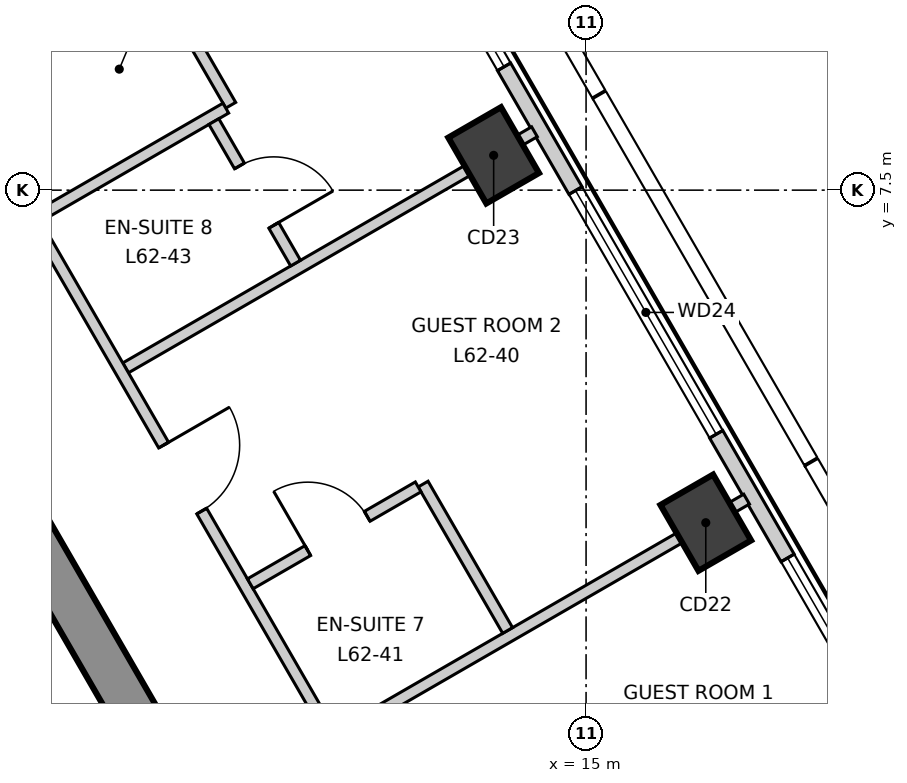
"""IFC4 building model, lengths in metres.
Left out: names, types, materials, properties, quantities, classifications, styles, units other than length and angle.
Written with IfcOpenShell. Run it as: python <this file> out.ifc"""

import sys

from ifc_helpers import new_model, si_unit, direction, frame, frame_2d, origin, origin_2d, place, context, subcontext, project, spatial, polyline, rectangle, outline, extrude, element, fill, save


model = new_model("IFC4")
c1 = context("Model", 3, precision=1e-05, world=origin(), true_north=direction((0.0, 1.0)))
c2 = subcontext(c1, "Body", "Model", "MODEL_VIEW")
j1 = project(units=[si_unit("LENGTHUNIT", "METRE"), si_unit("PLANEANGLEUNIT", "RADIAN")], contexts=[c1])
p1 = place(None, origin())
s1 = spatial("IfcSite", under=j1, at=p1, CompositionType="ELEMENT")
p2 = place(p1, origin())
s2 = spatial("IfcBuilding", under=s1, at=p2, CompositionType="ELEMENT")
p3 = place(p2, frame((0.0, 0.0, 268.3)))
s3 = spatial("IfcBuildingStorey", under=s2, at=p3, CompositionType="ELEMENT", Elevation=268.3)
p4 = place(p3, frame((12.384, -5.15, -0.3), z_axis=(0.0, 0.0, 1.0), x_axis=(-0.500000539815, 0.866025092122, 0.0)))
e1 = element("IfcWall", 1, at=p4, inside=s3, PredefinedType="SHEAR", context=c2, shape_type="SweptSolid", body=[
    extrude(outline(polyline([(-0.173, -0.301), (1.795, -0.301), (3.763, -0.301), (5.731, -0.301), (7.7, -0.301), (9.668, -0.301), (11.636, -0.301), (13.604, -0.3), (15.573, -0.3), (17.541, -0.3), (19.509, -0.3), (21.477, -0.3), (21.131, 0.3), (19.226, 0.3), (17.321, 0.3), (15.415, 0.3), (13.51, 0.3), (11.605, 0.3), (9.699, 0.3), (7.794, 0.3), (5.889, 0.3), (3.984, 0.3), (2.078, 0.3), (0.173, 0.3), (-0.173, -0.301)])), origin(), (0.0, 0.0, 1.0), 3.6),
])
p5 = place(p4, frame((15.627, 0.0, 0.3)))
e2 = element("IfcOpeningElement", 2, at=p5, cuts=e1, PredefinedType="OPENING", context=c2, shape_type="SweptSolid", body=[
    extrude(rectangle(XDim=0.9, YDim=2.1, at=frame_2d((0.45, 1.05))), frame((0.0, 0.31, 0.0), z_axis=(0.0, -1.0, 0.0), x_axis=(1.0, 0.0, 0.0)), (0.0, 0.0, 1.0), 0.621),
])
p6 = place(p4, frame((4.026, 0.0, 0.3)))
e3 = element("IfcOpeningElement", 3, at=p6, cuts=e1, PredefinedType="OPENING", context=c2, shape_type="SweptSolid", body=[
    extrude(rectangle(XDim=0.9, YDim=2.1, at=frame_2d((0.45, 1.05))), frame((0.0, 0.31, 0.0), z_axis=(0.0, -1.0, 0.0), x_axis=(1.0, 0.0, 0.0)), (0.0, 0.0, 1.0), 0.621),
])
for number, where, z_axis, x_axis in (
    (4, (16.575, 3.125, -0.3), (0.0, 0.0, 1.0), (-0.5, 0.866, 0.0)),
    (5, (13.784, 7.958, -0.3), (0.0, 0.0, 1.0), (-0.5, 0.866, 0.0)),
):
    element("IfcColumn", number, at=place(p3, frame(where, z_axis=z_axis, x_axis=x_axis)), inside=s3, PredefinedType="COLUMN", context=c2, shape_type="SweptSolid", body=[
        extrude(rectangle(XDim=1.0, YDim=0.8, at=origin_2d()), origin(), (0.0, 0.0, 1.0), 3.6),
    ])
p7 = place(p3, frame((26.205, -12.154, 0.0), z_axis=(0.0, 0.0, 1.0), x_axis=(-0.49999909388, 0.866025926932, 0.0)))
e6 = element("IfcWall", 6, at=p7, inside=s3, PredefinedType="ELEMENTEDWALL", context=c2, shape_type="SweptSolid", body=[
    extrude(rectangle(XDim=47.236, YDim=0.2, at=frame_2d((23.618, 0.0))), origin(), (0.0, 0.0, 1.0), 3.3),
])
p8 = place(p7, frame((2.243, 0.0, 0.9)))
e7 = element("IfcOpeningElement", 7, at=p8, cuts=e6, PredefinedType="OPENING", context=c2, shape_type="SweptSolid", body=[
    extrude(rectangle(XDim=3.7, YDim=2.2, at=frame_2d((1.85, 1.1))), frame((0.0, 0.11, 0.0), z_axis=(0.0, -1.0, 0.0), x_axis=(1.0, 0.0, 0.0)), (0.0, 0.0, 1.0), 0.22),
])
p9 = place(p7, frame((7.825, 0.0, 0.9)))
e8 = element("IfcOpeningElement", 8, at=p9, cuts=e6, PredefinedType="OPENING", context=c2, shape_type="SweptSolid", body=[
    extrude(rectangle(XDim=3.7, YDim=2.2, at=frame_2d((1.85, 1.1))), frame((0.0, 0.11, 0.0), z_axis=(0.0, -1.0, 0.0), x_axis=(1.0, 0.0, 0.0)), (0.0, 0.0, 1.0), 0.22),
])
p10 = place(p7, frame((13.406, 0.0, 0.9)))
e9 = element("IfcOpeningElement", 9, at=p10, cuts=e6, PredefinedType="OPENING", context=c2, shape_type="SweptSolid", body=[
    extrude(rectangle(XDim=3.7, YDim=2.2, at=frame_2d((1.85, 1.1))), frame((0.0, 0.11, 0.0), z_axis=(0.0, -1.0, 0.0), x_axis=(1.0, 0.0, 0.0)), (0.0, 0.0, 1.0), 0.22),
])
p11 = place(p7, frame((18.987, 0.0, 0.9)))
e10 = element("IfcOpeningElement", 10, at=p11, cuts=e6, PredefinedType="OPENING", context=c2, shape_type="SweptSolid", body=[
    extrude(rectangle(XDim=3.7, YDim=2.2, at=frame_2d((1.85, 1.1))), frame((0.0, 0.11, 0.0), z_axis=(0.0, -1.0, 0.0), x_axis=(1.0, 0.0, 0.0)), (0.0, 0.0, 1.0), 0.22),
])
p12 = place(p7, frame((24.569, 0.0, 0.9)))
e11 = element("IfcOpeningElement", 11, at=p12, cuts=e6, PredefinedType="OPENING", context=c2, shape_type="SweptSolid", body=[
    extrude(rectangle(XDim=3.7, YDim=2.2, at=frame_2d((1.85, 1.1))), frame((0.0, 0.11, 0.0), z_axis=(0.0, -1.0, 0.0), x_axis=(1.0, 0.0, 0.0)), (0.0, 0.0, 1.0), 0.22),
])
p13 = place(p7, frame((30.15, 0.0, 0.9)))
e12 = element("IfcOpeningElement", 12, at=p13, cuts=e6, PredefinedType="OPENING", context=c2, shape_type="SweptSolid", body=[
    extrude(rectangle(XDim=3.7, YDim=2.2, at=frame_2d((1.85, 1.1))), frame((0.0, 0.11, 0.0), z_axis=(0.0, -1.0, 0.0), x_axis=(1.0, 0.0, 0.0)), (0.0, 0.0, 1.0), 0.22),
])
p14 = place(p7, frame((35.732, 0.0, 0.9)))
e13 = element("IfcOpeningElement", 13, at=p14, cuts=e6, PredefinedType="OPENING", context=c2, shape_type="SweptSolid", body=[
    extrude(rectangle(XDim=3.7, YDim=2.2, at=frame_2d((1.85, 1.1))), frame((0.0, 0.11, 0.0), z_axis=(0.0, -1.0, 0.0), x_axis=(1.0, 0.0, 0.0)), (0.0, 0.0, 1.0), 0.22),
])
p15 = place(p7, frame((41.313, 0.0, 0.9)))
e14 = element("IfcOpeningElement", 14, at=p15, cuts=e6, PredefinedType="OPENING", context=c2, shape_type="SweptSolid", body=[
    extrude(rectangle(XDim=3.7, YDim=2.2, at=frame_2d((1.85, 1.1))), frame((0.0, 0.11, 0.0), z_axis=(0.0, -1.0, 0.0), x_axis=(1.0, 0.0, 0.0)), (0.0, 0.0, 1.0), 0.22),
])
p16 = place(p3, frame((8.942, 5.162, 0.0), z_axis=(0.0, 0.0, 1.0), x_axis=(0.866004272968, 0.500036597862, 0.0)))
e15 = element("IfcWall", 15, at=p16, inside=s3, PredefinedType="PARTITIONING", context=c2, shape_type="SweptSolid", body=[
    extrude(rectangle(XDim=6.211, YDim=0.15, at=frame_2d((3.106, 0.0))), origin(), (0.0, 0.0, 1.0), 2.8),
])
p17 = place(p3, frame((0.075, 20.37, 0.0), z_axis=(0.0, 0.0, 1.0), x_axis=(0.499988971979, -0.866031770721, 0.0)))
e16 = element("IfcWall", 16, at=p17, inside=s3, PredefinedType="PARTITIONING", context=c2, shape_type="SweptSolid", body=[
    extrude(rectangle(XDim=35.207, YDim=0.15, at=frame_2d((17.604, 0.0))), origin(), (0.0, 0.0, 1.0), 3.3),
])
p18 = place(p17, frame((31.606, 0.0, 0.0)))
e17 = element("IfcOpeningElement", 17, at=p18, cuts=e16, PredefinedType="OPENING", context=c2, shape_type="SweptSolid", body=[
    extrude(rectangle(XDim=1.0, YDim=2.1, at=frame_2d((0.5, 1.05))), frame((0.0, 0.085, 0.0), z_axis=(0.0, -1.0, 0.0), x_axis=(1.0, 0.0, 0.0)), (0.0, 0.0, 1.0), 0.17),
])
p19 = place(p17, frame((24.316, 0.0, 0.0)))
e18 = element("IfcOpeningElement", 18, at=p19, cuts=e16, PredefinedType="OPENING", context=c2, shape_type="SweptSolid", body=[
    extrude(rectangle(XDim=1.0, YDim=2.1, at=frame_2d((0.5, 1.05))), frame((0.0, 0.085, 0.0), z_axis=(0.0, -1.0, 0.0), x_axis=(1.0, 0.0, 0.0)), (0.0, 0.0, 1.0), 0.17),
])
p20 = place(p17, frame((18.735, 0.0, 0.0)))
e19 = element("IfcOpeningElement", 19, at=p20, cuts=e16, PredefinedType="OPENING", context=c2, shape_type="SweptSolid", body=[
    extrude(rectangle(XDim=1.0, YDim=2.1, at=frame_2d((0.5, 1.05))), frame((0.0, 0.085, 0.0), z_axis=(0.0, -1.0, 0.0), x_axis=(1.0, 0.0, 0.0)), (0.0, 0.0, 1.0), 0.17),
])
p21 = place(p17, frame((8.154, 0.0, 0.0)))
e20 = element("IfcOpeningElement", 20, at=p21, cuts=e16, PredefinedType="OPENING", context=c2, shape_type="SweptSolid", body=[
    extrude(rectangle(XDim=1.0, YDim=2.1, at=frame_2d((0.5, 1.05))), frame((0.0, 0.085, 0.0), z_axis=(0.0, -1.0, 0.0), x_axis=(1.0, 0.0, 0.0)), (0.0, 0.0, 1.0), 0.17),
])
p22 = place(p17, frame((13.754, 0.0, 0.0)))
e21 = element("IfcOpeningElement", 21, at=p22, cuts=e16, PredefinedType="OPENING", context=c2, shape_type="SweptSolid", body=[
    extrude(rectangle(XDim=0.9, YDim=2.1, at=frame_2d((0.45, 1.05))), frame((0.0, 0.085, 0.0), z_axis=(0.0, -1.0, 0.0), x_axis=(1.0, 0.0, 0.0)), (0.0, 0.0, 1.0), 0.17),
])
p23 = place(p17, frame((11.554, 0.0, 0.0)))
e22 = element("IfcOpeningElement", 22, at=p23, cuts=e16, PredefinedType="OPENING", context=c2, shape_type="SweptSolid", body=[
    extrude(rectangle(XDim=0.9, YDim=2.1, at=frame_2d((0.45, 1.05))), frame((0.0, 0.085, 0.0), z_axis=(0.0, -1.0, 0.0), x_axis=(1.0, 0.0, 0.0)), (0.0, 0.0, 1.0), 0.17),
])
p24 = place(p17, frame((2.69, 0.0, 0.0)))
e23 = element("IfcOpeningElement", 23, at=p24, cuts=e16, PredefinedType="OPENING", context=c2, shape_type="SweptSolid", body=[
    extrude(rectangle(XDim=1.0, YDim=2.1, at=frame_2d((0.5, 1.05))), frame((0.0, 0.085, 0.0), z_axis=(0.0, -1.0, 0.0), x_axis=(1.0, 0.0, 0.0)), (0.0, 0.0, 1.0), 0.17),
])
p25 = place(p3, frame((8.125, 12.427, 0.0), z_axis=(0.0, 0.0, 1.0), x_axis=(0.500036278648, -0.866004457284, 0.0)))
e24 = element("IfcWall", 24, at=p25, inside=s3, PredefinedType="PARTITIONING", context=c2, shape_type="SweptSolid", body=[
    extrude(rectangle(XDim=4.4, YDim=0.15, at=frame_2d((2.2, 0.0))), origin(), (0.0, 0.0, 1.0), 3.3),
])
for number, where, z_axis, x_axis in (
    (25, (6.692, 9.059, 0.0), (0.0, 0.0, 1.0), (0.866, 0.5, 0.0)),
    (26, (7.792, 7.154, 0.0), (0.0, 0.0, 1.0), (0.866, 0.5, 0.0)),
):
    element("IfcWall", number, at=place(p3, frame(where, z_axis=z_axis, x_axis=x_axis)), inside=s3, PredefinedType="PARTITIONING", context=c2, shape_type="SweptSolid", body=[
        extrude(rectangle(XDim=2.85, YDim=0.15, at=frame_2d((1.425, 0.0))), origin(), (0.0, 0.0, 1.0), 3.3),
    ])
p26 = place(p3, frame((11.732, 0.329, 0.0), z_axis=(0.0, 0.0, 1.0), x_axis=(0.866043575568, 0.499968524226, 0.0)))
e27 = element("IfcWall", 27, at=p26, inside=s3, PredefinedType="PARTITIONING", context=c2, shape_type="SweptSolid", body=[
    extrude(rectangle(XDim=6.212, YDim=0.15, at=frame_2d((3.106, 0.0))), origin(), (0.0, 0.0, 1.0), 3.3),
])
p27 = place(p3, frame((10.103, 8.402, 0.0), z_axis=(0.0, 0.0, 1.0), x_axis=(0.499961633463, -0.866047553582, 0.0)))
e28 = element("IfcWall", 28, at=p27, inside=s3, PredefinedType="PARTITIONING", context=c2, shape_type="SweptSolid", body=[
    extrude(rectangle(XDim=2.15, YDim=0.15, at=frame_2d((1.075, 0.0))), origin(), (0.0, 0.0, 1.0), 3.3),
])
p28 = place(p27, frame((0.675, 0.0, 0.0)))
e29 = element("IfcOpeningElement", 29, at=p28, cuts=e28, PredefinedType="OPENING", context=c2, shape_type="SweptSolid", body=[
    extrude(rectangle(XDim=0.9, YDim=2.1, at=frame_2d((0.45, 1.05))), frame((0.0, 0.085, 0.0), z_axis=(0.0, -1.0, 0.0), x_axis=(1.0, 0.0, 0.0)), (0.0, 0.0, 1.0), 0.17),
])
p29 = place(p3, frame((12.856, 3.633, 0.0), z_axis=(0.0, 0.0, 1.0), x_axis=(0.500023359282, -0.866011916877, 0.0)))
e30 = element("IfcWall", 30, at=p29, inside=s3, PredefinedType="PARTITIONING", context=c2, shape_type="SweptSolid", body=[
    extrude(rectangle(XDim=2.224, YDim=0.15, at=frame_2d((1.112, 0.0))), origin(), (0.0, 0.0, 1.0), 3.3),
])
p30 = place(p3, frame((10.582, 2.321, 0.0), z_axis=(0.0, 0.0, 1.0), x_axis=(0.866102706185, 0.499866084405, 0.0)))
e31 = element("IfcWall", 31, at=p30, inside=s3, PredefinedType="PARTITIONING", context=c2, shape_type="SweptSolid", body=[
    extrude(rectangle(XDim=2.551, YDim=0.15, at=frame_2d((1.275, 0.0))), origin(), (0.0, 0.0, 1.0), 3.3),
])
p31 = place(p30, frame((0.875, 0.0, 0.0)))
e32 = element("IfcOpeningElement", 32, at=p31, cuts=e31, PredefinedType="OPENING", context=c2, shape_type="SweptSolid", body=[
    extrude(rectangle(XDim=0.9, YDim=2.1, at=frame_2d((0.45, 1.05))), frame((0.0, 0.085, 0.0), z_axis=(0.0, -1.0, 0.0), x_axis=(1.0, 0.0, 0.0)), (0.0, 0.0, 1.0), 0.17),
])
p32 = place(p3, frame((6.826, 1.978, 0.0), z_axis=(0.0, 0.0, 1.0), x_axis=(0.499990139034, -0.866031096941, 0.0)))
e33 = element("IfcWall", 33, at=p32, inside=s3, PredefinedType="SOLIDWALL", context=c2, shape_type="SweptSolid", body=[
    extrude(rectangle(XDim=3.0, YDim=0.2, at=frame_2d((1.5, 0.0))), origin(), (0.0, 0.0, 1.0), 3.3),
])
p33 = place(p10, origin())
e34 = element("IfcWindow", 34, at=p33, inside=s3, PartitioningType="SINGLE_PANEL", PredefinedType="WINDOW", context=c2, shape_type="SweptSolid", body=[
    extrude(rectangle(XDim=3.7, YDim=2.2, at=frame_2d((1.85, 1.1))), frame((0.0, 0.03, 0.0), z_axis=(0.0, -1.0, 0.0), x_axis=(1.0, 0.0, 0.0)), (0.0, 0.0, 1.0), 0.06),
])
fill(e9, e34)
p34 = place(p11, origin())
e35 = element("IfcWindow", 35, at=p34, inside=s3, PartitioningType="SINGLE_PANEL", PredefinedType="WINDOW", context=c2, shape_type="SweptSolid", body=[
    extrude(rectangle(XDim=3.7, YDim=2.2, at=frame_2d((1.85, 1.1))), frame((0.0, 0.03, 0.0), z_axis=(0.0, -1.0, 0.0), x_axis=(1.0, 0.0, 0.0)), (0.0, 0.0, 1.0), 0.06),
])
fill(e10, e35)
p35 = place(p12, origin())
e36 = element("IfcWindow", 36, at=p35, inside=s3, PartitioningType="SINGLE_PANEL", PredefinedType="WINDOW", context=c2, shape_type="SweptSolid", body=[
    extrude(rectangle(XDim=3.7, YDim=2.2, at=frame_2d((1.85, 1.1))), frame((0.0, 0.03, 0.0), z_axis=(0.0, -1.0, 0.0), x_axis=(1.0, 0.0, 0.0)), (0.0, 0.0, 1.0), 0.06),
])
fill(e11, e36)
p36 = place(p20, origin())
e37 = element("IfcDoor", 37, at=p36, inside=s3, OperationType="SINGLE_SWING_RIGHT", PredefinedType="DOOR", context=c2, shape_type="SweptSolid", body=[
    extrude(rectangle(XDim=1.0, YDim=2.1, at=frame_2d((0.5, 1.05))), frame((0.0, 0.025, 0.0), z_axis=(0.0, -1.0, 0.0), x_axis=(1.0, 0.0, 0.0)), (0.0, 0.0, 1.0), 0.05),
])
fill(e19, e37)
p37 = place(p31, origin())
e38 = element("IfcDoor", 38, at=p37, inside=s3, OperationType="SINGLE_SWING_RIGHT", PredefinedType="DOOR", context=c2, shape_type="SweptSolid", body=[
    extrude(rectangle(XDim=0.9, YDim=2.1, at=frame_2d((0.45, 1.05))), frame((0.0, 0.025, 0.0), z_axis=(0.0, -1.0, 0.0), x_axis=(1.0, 0.0, 0.0)), (0.0, 0.0, 1.0), 0.05),
])
fill(e32, e38)
p38 = place(p28, origin())
e39 = element("IfcDoor", 39, at=p38, inside=s3, OperationType="SINGLE_SWING_LEFT", PredefinedType="DOOR", context=c2, shape_type="SweptSolid", body=[
    extrude(rectangle(XDim=0.9, YDim=2.1, at=frame_2d((0.45, 1.05))), frame((0.0, 0.025, 0.0), z_axis=(0.0, -1.0, 0.0), x_axis=(1.0, 0.0, 0.0)), (0.0, 0.0, 1.0), 0.05),
])
fill(e29, e39)
save(model, sys.argv[1])
